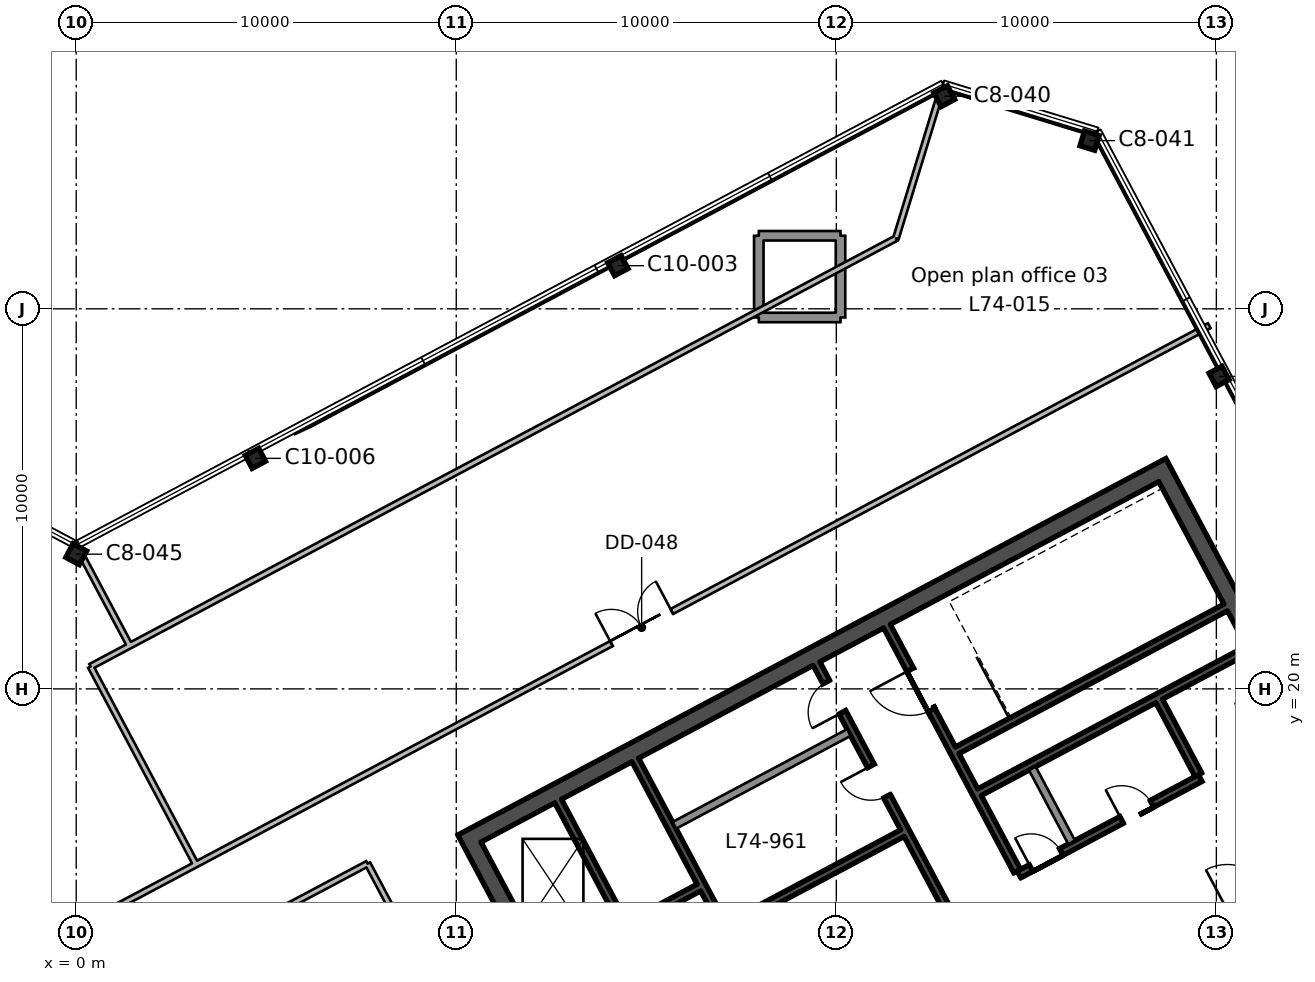
"""IFC4 building model, lengths in metres.
Left out: names, types, materials, properties, quantities, classifications, styles, units other than length and angle.
Written with IfcOpenShell. Run it as: python <this file> out.ifc"""

import sys

from ifc_helpers import new_model, si_unit, direction, frame, frame_2d, origin, origin_2d, place, context, subcontext, project, spatial, rectangle, i_section, extrude, element, fill, save


model = new_model("IFC4")
c1 = context("Model", 3, precision=1e-05, world=origin(), true_north=direction((0.0, 1.0)))
c2 = subcontext(c1, "Body", "Model", "MODEL_VIEW")
j1 = project(units=[si_unit("LENGTHUNIT", "METRE"), si_unit("PLANEANGLEUNIT", "RADIAN")], contexts=[c1])
p1 = place(None, origin())
s1 = spatial("IfcSite", under=j1, at=p1, CompositionType="ELEMENT")
p2 = place(p1, origin())
s2 = spatial("IfcBuilding", under=s1, at=p2, CompositionType="ELEMENT")
p3 = place(p2, frame((0.0, 0.0, 324.3)))
s3 = spatial("IfcBuildingStorey", under=s2, at=p3, CompositionType="ELEMENT", Elevation=324.3)
p4 = place(p3, frame((0.0, 23.544, 0.0), z_axis=(0.0, 0.0, 1.0), x_axis=(-0.882947592859, 0.469471562786, 0.0)))
e1 = element("IfcColumn", 1, at=p4, inside=s3, PredefinedType="COLUMN", context=c2, shape_type="SweptSolid", body=[
    extrude(i_section(OverallWidth=0.404, OverallDepth=0.406, WebThickness=0.027, FlangeThickness=0.044, FilletRadius=0.015, at=origin_2d()), origin(), (0.0, 0.0, 1.0), 3.9),
])
for number, where, z_axis, x_axis in (
    (2, (4.715, 26.065, 0.0), (0.0, 0.0, 1.0), (-0.883, -0.469, 0.0)),
    (3, (30.071, 28.221, 0.0), (0.0, 0.0, 1.0), (-0.469, 0.883, 0.0)),
    (4, (14.251, 31.135, 0.0), (0.0, 0.0, 1.0), (-0.883, -0.469, 0.0)),
):
    element("IfcColumn", number, at=place(p3, frame(where, z_axis=z_axis, x_axis=x_axis)), inside=s3, PredefinedType="COLUMN", context=c2, shape_type="SweptSolid", body=[
        extrude(i_section(OverallWidth=0.399, OverallDepth=0.386, WebThickness=0.021, FlangeThickness=0.033, FilletRadius=0.015, at=origin_2d()), origin(), (0.0, 0.0, 1.0), 3.9),
    ])
for number, where, z_axis, x_axis in (
    (5, (26.664, 34.425, 0.0), (0.0, 0.0, 1.0), (-0.956, 0.292, 0.0)),
    (6, (22.841, 35.594, 0.0), (0.0, 0.0, 1.0), (-0.883, -0.469, 0.0)),
):
    element("IfcColumn", number, at=place(p3, frame(where, z_axis=z_axis, x_axis=x_axis)), inside=s3, PredefinedType="COLUMN", context=c2, shape_type="SweptSolid", body=[
        extrude(i_section(OverallWidth=0.404, OverallDepth=0.406, WebThickness=0.027, FlangeThickness=0.044, FilletRadius=0.015, at=origin_2d()), origin(), (0.0, 0.0, 1.0), 3.9),
    ])
p5 = place(p3, frame((19.207, -0.604, 0.0), z_axis=(0.0, 0.0, 1.0), x_axis=(-0.469467968382, 0.882949504028, 0.0)))
e7 = element("IfcWall", 7, at=p5, inside=s3, PredefinedType="SHEAR", context=c2, shape_type="SweptSolid", body=[
    extrude(rectangle(XDim=19.1, YDim=0.45, at=frame_2d((9.55, 0.0))), origin(), (0.0, 0.0, 1.0), 3.9),
])
p6 = place(p5, frame((6.55, 0.0, 0.0)))
e8 = element("IfcOpeningElement", 8, at=p6, cuts=e7, PredefinedType="OPENING", context=c2, shape_type="SweptSolid", body=[
    extrude(rectangle(XDim=2.4, YDim=2.4, at=frame_2d((1.2, 1.2))), frame((0.0, 0.235, 0.0), z_axis=(0.0, -1.0, 0.0), x_axis=(1.0, 0.0, 0.0)), (0.0, 0.0, 1.0), 0.47),
])
p7 = place(p3, frame((37.439, 9.091, 0.0), z_axis=(0.0, 0.0, 1.0), x_axis=(-0.469467968382, 0.882949504028, 0.0)))
e9 = element("IfcWall", 9, at=p7, inside=s3, PredefinedType="SHEAR", context=c2, shape_type="SweptSolid", body=[
    extrude(rectangle(XDim=19.1, YDim=0.45, at=frame_2d((9.55, 0.0))), origin(), (0.0, 0.0, 1.0), 3.9),
])
p8 = place(p7, frame((10.15, 0.0, 0.0)))
e10 = element("IfcOpeningElement", 10, at=p8, cuts=e9, PredefinedType="OPENING", context=c2, shape_type="SweptSolid", body=[
    extrude(rectangle(XDim=2.4, YDim=2.4, at=frame_2d((1.2, 1.2))), frame((0.0, 0.235, 0.0), z_axis=(0.0, -1.0, 0.0), x_axis=(1.0, 0.0, 0.0)), (0.0, 0.0, 1.0), 0.47),
])
p9 = place(p3, frame((10.544, 16.167, 0.0), z_axis=(0.0, 0.0, 1.0), x_axis=(0.882947755831, 0.46947125628, 0.0)))
e11 = element("IfcWall", 11, at=p9, inside=s3, PredefinedType="SHEAR", context=c2, shape_type="SweptSolid", body=[
    extrude(rectangle(XDim=20.2, YDim=0.45, at=frame_2d((10.1, 0.0))), origin(), (0.0, 0.0, 1.0), 3.9),
])
p10 = place(p3, frame((14.394, 13.826, 0.0), z_axis=(0.0, 0.0, 1.0), x_axis=(-0.469494272526, 0.882935517501, 0.0)))
e12 = element("IfcWall", 12, at=p10, inside=s3, PredefinedType="SHEAR", context=c2, shape_type="SweptSolid", body=[
    extrude(rectangle(XDim=3.65, YDim=0.2, at=frame_2d((1.825, 0.0))), origin(), (0.0, 0.0, 1.0), 3.9),
])
p11 = place(p3, frame((18.138, 11.683, 0.0), z_axis=(0.0, 0.0, 1.0), x_axis=(-0.469480409012, 0.88294288918, 0.0)))
e13 = element("IfcWall", 13, at=p11, inside=s3, PredefinedType="SHEAR", context=c2, shape_type="SweptSolid", body=[
    extrude(rectangle(XDim=7.3, YDim=0.2, at=frame_2d((3.65, 0.0))), origin(), (0.0, 0.0, 1.0), 3.9),
])
p12 = place(p3, frame((19.569, 12.444, 0.0), z_axis=(0.0, 0.0, 1.0), x_axis=(-0.4694473164, 0.882960484464, 0.0)))
e14 = element("IfcWall", 14, at=p12, inside=s3, PredefinedType="SOLIDWALL", context=c2, shape_type="SweptSolid", body=[
    extrude(rectangle(XDim=2.2, YDim=0.2, at=frame_2d((1.1, 0.0))), origin(), (0.0, 0.0, 1.0), 3.9),
])
p13 = place(p3, frame((22.906, 14.218, 0.0), z_axis=(0.0, 0.0, 1.0), x_axis=(-0.469480409012, 0.88294288918, 0.0)))
e15 = element("IfcWall", 15, at=p13, inside=s3, PredefinedType="SHEAR", context=c2, shape_type="SweptSolid", body=[
    extrude(rectangle(XDim=7.3, YDim=0.2, at=frame_2d((3.65, 0.0))), origin(), (0.0, 0.0, 1.0), 3.9),
])
p14 = place(p13, frame((3.35, 0.0, 0.0)))
e16 = element("IfcOpeningElement", 16, at=p14, cuts=e15, PredefinedType="OPENING", context=c2, shape_type="SweptSolid", body=[
    extrude(rectangle(XDim=0.9, YDim=2.1, at=frame_2d((0.45, 1.05))), frame((0.0, 0.11, 0.0), z_axis=(0.0, -1.0, 0.0), x_axis=(1.0, 0.0, 0.0)), (0.0, 0.0, 1.0), 0.22),
])
p15 = place(p13, frame((5.85, 0.0, 0.0)))
e17 = element("IfcOpeningElement", 17, at=p15, cuts=e15, PredefinedType="OPENING", context=c2, shape_type="SweptSolid", body=[
    extrude(rectangle(XDim=0.9, YDim=2.1, at=frame_2d((0.45, 1.05))), frame((0.0, 0.11, 0.0), z_axis=(0.0, -1.0, 0.0), x_axis=(1.0, 0.0, 0.0)), (0.0, 0.0, 1.0), 0.22),
])
p16 = place(p3, frame((24.76, 15.204, 0.0), z_axis=(0.0, 0.0, 1.0), x_axis=(-0.469494272526, 0.882935517501, 0.0)))
e18 = element("IfcWall", 18, at=p16, inside=s3, PredefinedType="SHEAR", context=c2, shape_type="SweptSolid", body=[
    extrude(rectangle(XDim=7.3, YDim=0.2, at=frame_2d((3.65, 0.0))), origin(), (0.0, 0.0, 1.0), 3.9),
])
p17 = place(p16, frame((4.8, 0.0, 0.0)))
e19 = element("IfcOpeningElement", 19, at=p17, cuts=e18, PredefinedType="OPENING", context=c2, shape_type="SweptSolid", body=[
    extrude(rectangle(XDim=1.2, YDim=2.1, at=frame_2d((0.6, 1.05))), frame((0.0, 0.11, 0.0), z_axis=(0.0, -1.0, 0.0), x_axis=(1.0, 0.0, 0.0)), (0.0, 0.0, 1.0), 0.22),
])
p18 = place(p3, frame((26.191, 15.965, 0.0), z_axis=(0.0, 0.0, 1.0), x_axis=(-0.469533832133, 0.882914480843, 0.0)))
e20 = element("IfcWall", 20, at=p18, inside=s3, PredefinedType="SOLIDWALL", context=c2, shape_type="SweptSolid", body=[
    extrude(rectangle(XDim=2.2, YDim=0.2, at=frame_2d((1.1, 0.0))), origin(), (0.0, 0.0, 1.0), 3.9),
])
p19 = place(p3, frame((29.528, 17.739, 0.0), z_axis=(0.0, 0.0, 1.0), x_axis=(-0.469401318492, 0.882984938828, 0.0)))
e21 = element("IfcWall", 21, at=p19, inside=s3, PredefinedType="SHEAR", context=c2, shape_type="SweptSolid", body=[
    extrude(rectangle(XDim=2.2, YDim=0.2, at=frame_2d((1.1, 0.0))), origin(), (0.0, 0.0, 1.0), 3.9),
])
p20 = place(p3, frame((24.726, 11.222, 0.0), z_axis=(0.0, 0.0, 1.0), x_axis=(0.882940221191, 0.469485426614, 0.0)))
e22 = element("IfcWall", 22, at=p20, inside=s3, PredefinedType="SHEAR", context=c2, shape_type="SweptSolid", body=[
    extrude(rectangle(XDim=10.0, YDim=0.2, at=frame_2d((5.0, 0.0))), origin(), (0.0, 0.0, 1.0), 3.9),
])
p21 = place(p20, frame((6.3, 0.0, 0.0)))
e23 = element("IfcOpeningElement", 23, at=p21, cuts=e22, PredefinedType="OPENING", context=c2, shape_type="SweptSolid", body=[
    extrude(rectangle(XDim=1.2, YDim=2.1, at=frame_2d((0.6, 1.05))), frame((0.0, 0.11, 0.0), z_axis=(0.0, -1.0, 0.0), x_axis=(1.0, 0.0, 0.0)), (0.0, 0.0, 1.0), 0.22),
])
p22 = place(p20, frame((0.36, 0.0, 0.0)))
e24 = element("IfcOpeningElement", 24, at=p22, cuts=e22, PredefinedType="OPENING", context=c2, shape_type="SweptSolid", body=[
    extrude(rectangle(XDim=0.9, YDim=2.1, at=frame_2d((0.45, 1.05))), frame((0.0, 0.11, 0.0), z_axis=(0.0, -1.0, 0.0), x_axis=(1.0, 0.0, 0.0)), (0.0, 0.0, 1.0), 0.22),
])
p23 = place(p20, frame((3.06, 0.0, 0.0)))
e25 = element("IfcOpeningElement", 25, at=p23, cuts=e22, PredefinedType="OPENING", context=c2, shape_type="SweptSolid", body=[
    extrude(rectangle(XDim=0.9, YDim=2.1, at=frame_2d((0.45, 1.05))), frame((0.0, 0.11, 0.0), z_axis=(0.0, -1.0, 0.0), x_axis=(1.0, 0.0, 0.0)), (0.0, 0.0, 1.0), 0.22),
])
p24 = place(p3, frame((24.807, 15.116, 0.0), z_axis=(0.0, 0.0, 1.0), x_axis=(0.882942972946, 0.469480251476, 0.0)))
e26 = element("IfcWall", 26, at=p24, inside=s3, PredefinedType="SHEAR", context=c2, shape_type="SweptSolid", body=[
    extrude(rectangle(XDim=5.4, YDim=0.2, at=frame_2d((2.7, 0.0))), origin(), (0.0, 0.0, 1.0), 3.9),
])
p25 = place(p24, frame((0.36, 0.0, 0.0)))
e27 = element("IfcOpeningElement", 27, at=p25, cuts=e26, PredefinedType="OPENING", context=c2, shape_type="SweptSolid", body=[
    extrude(rectangle(XDim=0.9, YDim=2.1, at=frame_2d((0.45, 1.05))), frame((0.0, 0.11, 0.0), z_axis=(0.0, -1.0, 0.0), x_axis=(1.0, 0.0, 0.0)), (0.0, 0.0, 1.0), 0.22),
])
p26 = place(p24, frame((3.06, 0.0, 0.0)))
e28 = element("IfcOpeningElement", 28, at=p26, cuts=e26, PredefinedType="OPENING", context=c2, shape_type="SweptSolid", body=[
    extrude(rectangle(XDim=0.9, YDim=2.1, at=frame_2d((0.45, 1.05))), frame((0.0, 0.11, 0.0), z_axis=(0.0, -1.0, 0.0), x_axis=(1.0, 0.0, 0.0)), (0.0, 0.0, 1.0), 0.22),
])
p27 = place(p3, frame((17.147, 13.761, 0.0), z_axis=(0.0, 0.0, 1.0), x_axis=(0.882964314875, 0.469440111896, 0.0)))
e29 = element("IfcWall", 29, at=p27, inside=s3, PredefinedType="SHEAR", context=c2, shape_type="SweptSolid", body=[
    extrude(rectangle(XDim=5.2, YDim=0.2, at=frame_2d((2.6, 0.0))), origin(), (0.0, 0.0, 1.0), 3.9),
])
p28 = place(p3, frame((23.769, 17.282, 0.0), z_axis=(0.0, 0.0, 1.0), x_axis=(0.882940221191, 0.469485426614, 0.0)))
e30 = element("IfcWall", 30, at=p28, inside=s3, PredefinedType="SHEAR", context=c2, shape_type="SweptSolid", body=[
    extrude(rectangle(XDim=8.0, YDim=0.2, at=frame_2d((4.0, 0.0))), origin(), (0.0, 0.0, 1.0), 3.9),
])
p29 = place(p3, frame((12.41, 12.658, 0.0), z_axis=(0.0, 0.0, 1.0), x_axis=(0.8829484765, 0.469469900894, 0.0)))
e31 = element("IfcWall", 31, at=p29, inside=s3, PredefinedType="SHEAR", context=c2, shape_type="SweptSolid", body=[
    extrude(rectangle(XDim=4.5, YDim=0.2, at=frame_2d((2.25, 0.0))), origin(), (0.0, 0.0, 1.0), 3.9),
])
p30 = place(p29, frame((0.6, 0.0, 0.0)))
e32 = element("IfcOpeningElement", 32, at=p30, cuts=e31, PredefinedType="OPENING", context=c2, shape_type="SweptSolid", body=[
    extrude(rectangle(XDim=1.1, YDim=2.1, at=frame_2d((0.55, 1.05))), frame((0.0, 0.11, 0.0), z_axis=(0.0, -1.0, 0.0), x_axis=(1.0, 0.0, 0.0)), (0.0, 0.0, 1.0), 0.22),
])
p31 = place(p3, frame((23.182, 18.385, 0.0), z_axis=(0.0, 0.0, 1.0), x_axis=(0.88295287151, 0.469461634952, 0.0)))
e33 = element("IfcWall", 33, at=p31, inside=s3, PredefinedType="SHEAR", context=c2, shape_type="SweptSolid", body=[
    extrude(rectangle(XDim=8.0, YDim=0.2, at=frame_2d((4.0, 0.0))), origin(), (0.0, 0.0, 1.0), 3.9),
])
p32 = place(p3, frame((15.739, 16.409, 0.0), z_axis=(0.0, 0.0, 1.0), x_axis=(0.882934506056, 0.469496174655, 0.0)))
e34 = element("IfcWall", 34, at=p32, inside=s3, PredefinedType="SOLIDWALL", context=c2, shape_type="SweptSolid", body=[
    extrude(rectangle(XDim=5.2, YDim=0.2, at=frame_2d((2.6, 0.0))), origin(), (0.0, 0.0, 1.0), 3.9),
])
p33 = place(p3, frame((20.111, 31.922, 3.9), z_axis=(0.0, 0.0, 1.0), x_axis=(0.0, -1.0, 0.0)))
e35 = element("IfcWall", 35, at=p33, inside=s3, PredefinedType="STANDARD", context=c2, shape_type="SweptSolid", body=[
    extrude(rectangle(XDim=2.15, YDim=0.25, at=frame_2d((1.075, 0.0))), origin(), (0.0, 0.0, 1.0), 0.6),
])
p34 = place(p3, frame((20.111, 29.772, 3.9), z_axis=(0.0, 0.0, 1.0), x_axis=(-1.0, 0.0, 0.0)))
e36 = element("IfcWall", 36, at=p34, inside=s3, PredefinedType="STANDARD", context=c2, shape_type="SweptSolid", body=[
    extrude(rectangle(XDim=2.15, YDim=0.25, at=frame_2d((1.075, 0.0))), origin(), (0.0, 0.0, 1.0), 0.6),
])
p35 = place(p3, frame((17.961, 29.772, 3.9), z_axis=(0.0, 0.0, 1.0), x_axis=(0.0, 1.0, 0.0)))
e37 = element("IfcWall", 37, at=p35, inside=s3, PredefinedType="STANDARD", context=c2, shape_type="SweptSolid", body=[
    extrude(rectangle(XDim=2.15, YDim=0.25, at=frame_2d((1.075, 0.0))), origin(), (0.0, 0.0, 1.0), 0.6),
])
p36 = place(p3, frame((17.961, 31.922, 3.9), z_axis=(0.0, 0.0, 1.0), x_axis=(1.0, 0.0, 0.0)))
e38 = element("IfcWall", 38, at=p36, inside=s3, PredefinedType="STANDARD", context=c2, shape_type="SweptSolid", body=[
    extrude(rectangle(XDim=2.15, YDim=0.25, at=frame_2d((1.075, 0.0))), origin(), (0.0, 0.0, 1.0), 0.6),
])
p37 = place(p3, frame((-48.947, 39.73, 0.0), z_axis=(0.0, 0.0, 1.0), x_axis=(0.882945454821, -0.469475583828, 0.0)))
e39 = element("IfcWall", 39, at=p37, inside=s3, PredefinedType="PARTITIONING", context=c2, shape_type="SweptSolid", body=[
    extrude(rectangle(XDim=55.436, YDim=0.15, at=frame_2d((27.718, 0.0))), origin(), (0.0, 0.0, 1.0), 3.5),
])
p38 = place(p37, frame((28.35, 0.0, 0.0)))
e40 = element("IfcOpeningElement", 40, at=p38, cuts=e39, PredefinedType="OPENING", context=c2, shape_type="SweptSolid", body=[
    extrude(rectangle(XDim=1.8, YDim=2.1, at=frame_2d((0.9, 1.05))), frame((0.0, 0.085, 0.0), z_axis=(0.0, -1.0, 0.0), x_axis=(1.0, 0.0, 0.0)), (0.0, 0.0, 1.0), 0.17),
])
p39 = place(p37, frame((26.7, 0.0, 0.0)))
e41 = element("IfcOpeningElement", 41, at=p39, cuts=e39, PredefinedType="OPENING", context=c2, shape_type="SweptSolid", body=[
    extrude(rectangle(XDim=1.0, YDim=2.1, at=frame_2d((0.5, 1.05))), frame((0.0, 0.085, 0.0), z_axis=(0.0, -1.0, 0.0), x_axis=(1.0, 0.0, 0.0)), (0.0, 0.0, 1.0), 0.17),
])
p40 = place(p37, frame((15.65, 0.0, 0.0)))
e42 = element("IfcOpeningElement", 42, at=p40, cuts=e39, PredefinedType="OPENING", context=c2, shape_type="SweptSolid", body=[
    extrude(rectangle(XDim=1.0, YDim=2.1, at=frame_2d((0.5, 1.05))), frame((0.0, 0.085, 0.0), z_axis=(0.0, -1.0, 0.0), x_axis=(1.0, 0.0, 0.0)), (0.0, 0.0, 1.0), 0.17),
])
p41 = place(p3, frame((0.0, 13.704, 0.0), z_axis=(0.0, 0.0, 1.0), x_axis=(0.882954463269, 0.469458641196, 0.0)))
e43 = element("IfcWall", 43, at=p41, inside=s3, PredefinedType="PARTITIONING", context=c2, shape_type="SweptSolid", body=[
    extrude(rectangle(XDim=33.766, YDim=0.15, at=frame_2d((16.883, 0.0))), origin(), (0.0, 0.0, 1.0), 3.5),
])
p42 = place(p41, frame((15.95, 0.0, 0.0)))
e44 = element("IfcOpeningElement", 44, at=p42, cuts=e43, PredefinedType="OPENING", context=c2, shape_type="SweptSolid", body=[
    extrude(rectangle(XDim=1.8, YDim=2.1, at=frame_2d((0.9, 1.05))), frame((0.0, 0.085, 0.0), z_axis=(0.0, -1.0, 0.0), x_axis=(1.0, 0.0, 0.0)), (0.0, 0.0, 1.0), 0.17),
])
p43 = place(p3, frame((2.487, 16.624, 0.0), z_axis=(0.0, 0.0, 1.0), x_axis=(0.469087751625, -0.883151561894, 0.0)))
e45 = element("IfcWall", 45, at=p43, inside=s3, PredefinedType="PARTITIONING", context=c2, shape_type="SweptSolid", body=[
    extrude(rectangle(XDim=1.411, YDim=0.15, at=frame_2d((0.706, 0.0))), origin(), (0.0, 0.0, 1.0), 3.5),
])
p44 = place(p3, frame((0.178, 23.45, 0.0), z_axis=(0.0, 0.0, 1.0), x_axis=(0.469495603372, -0.882934809833, 0.0)))
e46 = element("IfcWall", 46, at=p44, inside=s3, PredefinedType="PARTITIONING", context=c2, shape_type="SweptSolid", body=[
    extrude(rectangle(XDim=2.622, YDim=0.15, at=frame_2d((1.311, 0.0))), origin(), (0.0, 0.0, 1.0), 3.5),
])
p45 = place(p3, frame((1.405, 21.133, 0.0), z_axis=(0.0, 0.0, 1.0), x_axis=(0.882938487938, 0.46948868625, 0.0)))
e47 = element("IfcWall", 47, at=p45, inside=s3, PredefinedType="PARTITIONING", context=c2, shape_type="SweptSolid", body=[
    extrude(rectangle(XDim=22.837, YDim=0.15, at=frame_2d((11.419, 0.0))), origin(), (0.0, 0.0, 1.0), 3.5),
])
p46 = place(p3, frame((21.569, 31.855, 0.0), z_axis=(0.0, 0.0, 1.0), x_axis=(0.292806976968, 0.956171571549, 0.0)))
e48 = element("IfcWall", 48, at=p46, inside=s3, PredefinedType="PARTITIONING", context=c2, shape_type="SweptSolid", body=[
    extrude(rectangle(XDim=3.784, YDim=0.15, at=frame_2d((1.892, 0.0))), origin(), (0.0, 0.0, 1.0), 3.5),
])
p47 = place(p3, frame((2.487, 16.624, 0.0), z_axis=(0.0, 0.0, 1.0), x_axis=(-0.469563370993, 0.882898771447, 0.0)))
e49 = element("IfcWall", 49, at=p47, inside=s3, PredefinedType="PARTITIONING", context=c2, shape_type="SweptSolid", body=[
    extrude(rectangle(XDim=4.49, YDim=0.15, at=frame_2d((2.245, 0.0))), origin(), (0.0, 0.0, 1.0), 3.5),
])
p48 = place(p3, frame((1.405, 21.133, 0.0), z_axis=(0.0, 0.0, 1.0), x_axis=(-0.882753784089, -0.469835882704, 0.0)))
e50 = element("IfcWall", 50, at=p48, inside=s3, PredefinedType="PARTITIONING", context=c2, shape_type="SweptSolid", body=[
    extrude(rectangle(XDim=1.162, YDim=0.15, at=frame_2d((0.581, 0.0))), origin(), (0.0, 0.0, 1.0), 3.5),
])
p49 = place(p3, frame((8.625, 13.6, 0.0), z_axis=(0.0, 0.0, 1.0), x_axis=(-0.469420518513, 0.882974731688, 0.0)))
e51 = element("IfcWall", 51, at=p49, inside=s3, PredefinedType="PARTITIONING", context=c2, shape_type="SweptSolid", body=[
    extrude(rectangle(XDim=2.041, YDim=0.15, at=frame_2d((1.021, 0.0))), origin(), (0.0, 0.0, 1.0), 3.5),
])
p50 = place(p3, frame((7.667, 15.402, 0.0), z_axis=(0.0, 0.0, 1.0), x_axis=(-0.882994654303, -0.469383042378, 0.0)))
e52 = element("IfcWall", 52, at=p50, inside=s3, PredefinedType="PARTITIONING", context=c2, shape_type="SweptSolid", body=[
    extrude(rectangle(XDim=3.839, YDim=0.15, at=frame_2d((1.919, 0.0))), origin(), (0.0, 0.0, 1.0), 3.5),
])
p51 = place(p21, origin())
e53 = element("IfcDoor", 53, at=p51, inside=s3, OperationType="SINGLE_SWING_LEFT", PredefinedType="DOOR", context=c2, shape_type="SweptSolid", body=[
    extrude(rectangle(XDim=1.2, YDim=2.1, at=frame_2d((0.6, 1.05))), frame((0.0, 0.025, 0.0), z_axis=(0.0, -1.0, 0.0), x_axis=(1.0, 0.0, 0.0)), (0.0, 0.0, 1.0), 0.05),
])
fill(e23, e53)
p52 = place(p17, origin())
e54 = element("IfcDoor", 54, at=p52, inside=s3, OperationType="SINGLE_SWING_RIGHT", PredefinedType="DOOR", context=c2, shape_type="SweptSolid", body=[
    extrude(rectangle(XDim=1.2, YDim=2.1, at=frame_2d((0.6, 1.05))), frame((0.0, 0.025, 0.0), z_axis=(0.0, -1.0, 0.0), x_axis=(1.0, 0.0, 0.0)), (0.0, 0.0, 1.0), 0.05),
])
fill(e19, e54)
p53 = place(p25, origin())
e55 = element("IfcDoor", 55, at=p53, inside=s3, OperationType="SINGLE_SWING_LEFT", PredefinedType="DOOR", context=c2, shape_type="SweptSolid", body=[
    extrude(rectangle(XDim=0.9, YDim=2.1, at=frame_2d((0.45, 1.05))), frame((0.0, 0.025, 0.0), z_axis=(0.0, -1.0, 0.0), x_axis=(1.0, 0.0, 0.0)), (0.0, 0.0, 1.0), 0.05),
])
fill(e27, e55)
p54 = place(p26, origin())
e56 = element("IfcDoor", 56, at=p54, inside=s3, OperationType="SINGLE_SWING_LEFT", PredefinedType="DOOR", context=c2, shape_type="SweptSolid", body=[
    extrude(rectangle(XDim=0.9, YDim=2.1, at=frame_2d((0.45, 1.05))), frame((0.0, 0.025, 0.0), z_axis=(0.0, -1.0, 0.0), x_axis=(1.0, 0.0, 0.0)), (0.0, 0.0, 1.0), 0.05),
])
fill(e28, e56)
p55 = place(p14, origin())
e57 = element("IfcDoor", 57, at=p55, inside=s3, OperationType="SINGLE_SWING_RIGHT", PredefinedType="DOOR", context=c2, shape_type="SweptSolid", body=[
    extrude(rectangle(XDim=0.9, YDim=2.1, at=frame_2d((0.45, 1.05))), frame((0.0, 0.025, 0.0), z_axis=(0.0, -1.0, 0.0), x_axis=(1.0, 0.0, 0.0)), (0.0, 0.0, 1.0), 0.05),
])
fill(e16, e57)
p56 = place(p15, origin())
e58 = element("IfcDoor", 58, at=p56, inside=s3, OperationType="SINGLE_SWING_LEFT", PredefinedType="DOOR", context=c2, shape_type="SweptSolid", body=[
    extrude(rectangle(XDim=0.9, YDim=2.1, at=frame_2d((0.45, 1.05))), frame((0.0, 0.025, 0.0), z_axis=(0.0, -1.0, 0.0), x_axis=(1.0, 0.0, 0.0)), (0.0, 0.0, 1.0), 0.05),
])
fill(e17, e58)
p57 = place(p42, origin())
e59 = element("IfcDoor", 59, at=p57, inside=s3, OperationType="DOUBLE_DOOR_SINGLE_SWING", PredefinedType="DOOR", context=c2, shape_type="SweptSolid", body=[
    extrude(rectangle(XDim=1.8, YDim=2.1, at=frame_2d((0.9, 1.05))), frame((0.0, 0.025, 0.0), z_axis=(0.0, -1.0, 0.0), x_axis=(1.0, 0.0, 0.0)), (0.0, 0.0, 1.0), 0.05),
])
fill(e44, e59)
save(model, sys.argv[1])
